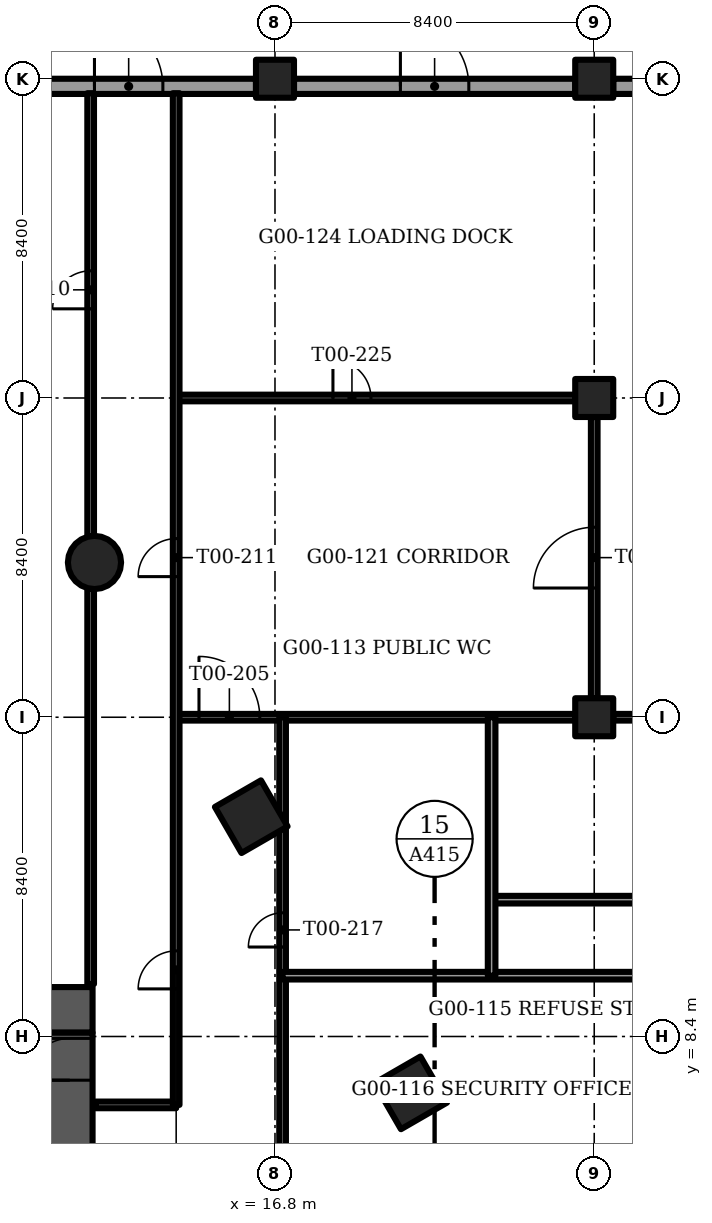
"""IFC4 building model, lengths in metres.
Left out: names, types, materials, properties, quantities, classifications, styles, units other than length and angle.
Written with IfcOpenShell. Run it as: python <this file> out.ifc"""

import sys

from ifc_helpers import new_model, si_unit, direction, frame, frame_2d, origin, origin_2d, place, context, subcontext, project, spatial, rectangle, circle, extrude, element, fill, save


model = new_model("IFC4")
c1 = context("Model", 3, precision=1e-05, world=origin(), true_north=direction((0.0, 1.0)))
c2 = subcontext(c1, "Body", "Model", "MODEL_VIEW")
j1 = project(units=[si_unit("LENGTHUNIT", "METRE"), si_unit("PLANEANGLEUNIT", "RADIAN")], contexts=[c1])
p1 = place(None, origin())
s1 = spatial("IfcSite", under=j1, at=p1, CompositionType="ELEMENT")
p2 = place(p1, origin())
s2 = spatial("IfcBuilding", under=s1, at=p2, CompositionType="ELEMENT")
p3 = place(p2, origin())
s3 = spatial("IfcBuildingStorey", under=s2, at=p3, CompositionType="ELEMENT", Elevation=0.0)
for number, where, z_axis, x_axis in (
    (1, (16.8, 33.6, -0.35), (0.0, 0.0, 1.0), (1.0, 0.0, 0.0)),
    (2, (25.2, 16.8, -0.35), (0.0, 0.0, 1.0), (1.0, 0.0, 0.0)),
    (3, (25.2, 25.2, -0.35), (0.0, 0.0, 1.0), (1.0, 0.0, 0.0)),
    (4, (25.2, 33.6, -0.35), (0.0, 0.0, 1.0), (1.0, 0.0, 0.0)),
):
    element("IfcColumn", number, at=place(p3, frame(where, z_axis=z_axis, x_axis=x_axis)), inside=s3, PredefinedType="COLUMN", context=c2, shape_type="SweptSolid", body=[
        extrude(rectangle(XDim=1.0, YDim=1.0, at=origin_2d()), origin(), (0.0, 0.0, 1.0), 6.0),
    ])
p4 = place(p3, frame((12.051, 20.872, -0.35), z_axis=(0.0, 0.0, 1.0), x_axis=(1.0, 0.0, 0.0)))
e5 = element("IfcColumn", 5, at=p4, inside=s3, PredefinedType="COLUMN", context=c2, shape_type="SweptSolid", body=[
    extrude(circle(Radius=0.7, at=origin_2d()), origin(), (0.0, 0.0, 1.0), 5.15),
])
for number, where, z_axis, x_axis in (
    (6, (20.371, 6.917, -0.35), (0.0, 0.0, 1.0), (0.5, -0.866, 0.0)),
    (7, (16.175, 14.183, -0.35), (0.0, 0.0, 1.0), (0.5, -0.866, 0.0)),
):
    element("IfcColumn", number, at=place(p3, frame(where, z_axis=z_axis, x_axis=x_axis)), inside=s3, PredefinedType="COLUMN", context=c2, shape_type="SweptSolid", body=[
        extrude(rectangle(XDim=1.4, YDim=1.4, at=origin_2d()), origin(), (0.0, 0.0, 1.0), 5.15),
    ])
p5 = place(p3, frame((-12.0, 9.1, -0.35), z_axis=(0.0, 0.0, 1.0), x_axis=(1.0, 0.0, 0.0)))
e8 = element("IfcWall", 8, at=p5, inside=s3, PredefinedType="SHEAR", context=c2, shape_type="SweptSolid", body=[
    extrude(rectangle(XDim=24.0, YDim=1.2, at=frame_2d((12.0, 0.0))), origin(), (0.0, 0.0, 1.0), 6.0),
])
p6 = place(p5, frame((11.2, 0.0, 0.0)))
e9 = element("IfcOpeningElement", 9, at=p6, cuts=e8, PredefinedType="OPENING", context=c2, shape_type="SweptSolid", body=[
    extrude(rectangle(XDim=1.6, YDim=2.1, at=frame_2d((0.8, 1.05))), frame((0.0, 0.6, 0.0), z_axis=(0.0, -1.0, 0.0), x_axis=(1.0, 0.0, 0.0)), (0.0, 0.0, 1.0), 1.2),
])
p7 = place(p5, frame((5.25, 0.0, 0.0)))
e10 = element("IfcOpeningElement", 10, at=p7, cuts=e8, PredefinedType="OPENING", context=c2, shape_type="SweptSolid", body=[
    extrude(rectangle(XDim=1.1, YDim=2.1, at=frame_2d((0.55, 1.05))), frame((0.0, 0.6, 0.0), z_axis=(0.0, -1.0, 0.0), x_axis=(1.0, 0.0, 0.0)), (0.0, 0.0, 1.0), 1.2),
])
p8 = place(p5, frame((17.65, 0.0, 0.0)))
e11 = element("IfcOpeningElement", 11, at=p8, cuts=e8, PredefinedType="OPENING", context=c2, shape_type="SweptSolid", body=[
    extrude(rectangle(XDim=1.1, YDim=2.1, at=frame_2d((0.55, 1.05))), frame((0.0, 0.6, 0.0), z_axis=(0.0, -1.0, 0.0), x_axis=(1.0, 0.0, 0.0)), (0.0, 0.0, 1.0), 1.2),
])
p9 = place(p3, frame((11.4, -0.5, -0.35), z_axis=(0.0, 0.0, 1.0), x_axis=(0.0, 1.0, 0.0)))
e12 = element("IfcWall", 12, at=p9, inside=s3, PredefinedType="SHEAR", context=c2, shape_type="SweptSolid", body=[
    extrude(rectangle(XDim=9.0, YDim=1.2, at=frame_2d((4.5, 0.0))), origin(), (0.0, 0.0, 1.0), 6.0),
])
p10 = place(p9, frame((7.75, 0.0, 0.0)))
e13 = element("IfcOpeningElement", 13, at=p10, cuts=e12, PredefinedType="OPENING", context=c2, shape_type="SweptSolid", body=[
    extrude(rectangle(XDim=1.1, YDim=2.1, at=frame_2d((0.55, 1.05))), frame((0.0, 0.6, 0.0), z_axis=(0.0, -1.0, 0.0), x_axis=(1.0, 0.0, 0.0)), (0.0, 0.0, 1.0), 1.2),
])
p11 = place(p9, frame((0.55, 0.0, 0.0)))
e14 = element("IfcOpeningElement", 14, at=p11, cuts=e12, PredefinedType="OPENING", context=c2, shape_type="SweptSolid", body=[
    extrude(rectangle(XDim=1.2, YDim=2.1, at=frame_2d((0.6, 1.05))), frame((0.0, 0.6, 0.0), z_axis=(0.0, -1.0, 0.0), x_axis=(1.0, 0.0, 0.0)), (0.0, 0.0, 1.0), 1.2),
])
p12 = place(p9, frame((3.0, 0.0, 0.0)))
e15 = element("IfcOpeningElement", 15, at=p12, cuts=e12, PredefinedType="OPENING", context=c2, shape_type="SweptSolid", body=[
    extrude(rectangle(XDim=1.2, YDim=2.1, at=frame_2d((0.6, 1.05))), frame((0.0, 0.6, 0.0), z_axis=(0.0, -1.0, 0.0), x_axis=(1.0, 0.0, 0.0)), (0.0, 0.0, 1.0), 1.2),
])
p13 = place(p3, frame((8.9, 33.4, 0.0), z_axis=(0.0, 0.0, 1.0), x_axis=(1.0, 0.0, 0.0)))
e16 = element("IfcWall", 16, at=p13, inside=s3, PredefinedType="SOLIDWALL", context=c2, shape_type="SweptSolid", body=[
    extrude(rectangle(XDim=7.4, YDim=0.4, at=frame_2d((3.7, 0.0))), origin(), (0.0, 0.0, 1.0), 5.65),
])
p14 = place(p13, frame((3.15, 0.0, 0.0)))
e17 = element("IfcOpeningElement", 17, at=p14, cuts=e16, PredefinedType="OPENING", context=c2, shape_type="SweptSolid", body=[
    extrude(rectangle(XDim=1.8, YDim=2.1, at=frame_2d((0.9, 1.05))), frame((0.0, 0.2, 0.0), z_axis=(0.0, -1.0, 0.0), x_axis=(1.0, 0.0, 0.0)), (0.0, 0.0, 1.0), 0.4),
])
p15 = place(p3, frame((17.3, 33.4, 0.0), z_axis=(0.0, 0.0, 1.0), x_axis=(1.0, 0.0, 0.0)))
e18 = element("IfcWall", 18, at=p15, inside=s3, PredefinedType="SOLIDWALL", context=c2, shape_type="SweptSolid", body=[
    extrude(rectangle(XDim=7.4, YDim=0.4, at=frame_2d((3.7, 0.0))), origin(), (0.0, 0.0, 1.0), 5.65),
])
p16 = place(p15, frame((2.8, 0.0, 0.0)))
e19 = element("IfcOpeningElement", 19, at=p16, cuts=e18, PredefinedType="OPENING", context=c2, shape_type="SweptSolid", body=[
    extrude(rectangle(XDim=1.8, YDim=2.4, at=frame_2d((0.9, 1.2))), frame((0.0, 0.2, 0.0), z_axis=(0.0, -1.0, 0.0), x_axis=(1.0, 0.0, 0.0)), (0.0, 0.0, 1.0), 0.4),
])
p17 = place(p3, frame((25.7, 33.4, 0.0), z_axis=(0.0, 0.0, 1.0), x_axis=(1.0, 0.0, 0.0)))
e20 = element("IfcWall", 20, at=p17, inside=s3, PredefinedType="SOLIDWALL", context=c2, shape_type="SweptSolid", body=[
    extrude(rectangle(XDim=7.4, YDim=0.4, at=frame_2d((3.7, 0.0))), origin(), (0.0, 0.0, 1.0), 5.65),
])
p18 = place(p17, frame((2.2, 0.0, 1.0)))
e21 = element("IfcOpeningElement", 21, at=p18, cuts=e20, PredefinedType="OPENING", context=c2, shape_type="SweptSolid", body=[
    extrude(rectangle(XDim=3.0, YDim=2.2, at=frame_2d((1.5, 1.1))), frame((0.0, 0.2, 0.0), z_axis=(0.0, -1.0, 0.0), x_axis=(1.0, 0.0, 0.0)), (0.0, 0.0, 1.0), 0.4),
])
p19 = place(p3, frame((12.08, 6.6, 0.0), z_axis=(0.0, 0.0, 1.0), x_axis=(1.0, 0.0, 0.0)))
e22 = element("IfcWall", 22, at=p19, inside=s3, PredefinedType="PARTITIONING", context=c2, shape_type="SweptSolid", body=[
    extrude(rectangle(XDim=2.12, YDim=0.175, at=frame_2d((1.06, 0.0))), origin(), (0.0, 0.0, 1.0), 5.65),
])
p20 = place(p3, frame((14.2, 16.8, 0.0), z_axis=(0.0, 0.0, 1.0), x_axis=(1.0, 0.0, 0.0)))
e23 = element("IfcWall", 23, at=p20, inside=s3, PredefinedType="PARTITIONING", context=c2, shape_type="SweptSolid", body=[
    extrude(rectangle(XDim=10.5, YDim=0.175, at=frame_2d((5.25, 0.0))), origin(), (0.0, 0.0, 1.0), 4.8),
])
p21 = place(p20, frame((0.6, 0.0, 0.0)))
e24 = element("IfcOpeningElement", 24, at=p21, cuts=e23, PredefinedType="OPENING", context=c2, shape_type="SweptSolid", body=[
    extrude(rectangle(XDim=1.6, YDim=2.1, at=frame_2d((0.8, 1.05))), frame((0.0, 0.087, 0.0), z_axis=(0.0, -1.0, 0.0), x_axis=(1.0, 0.0, 0.0)), (0.0, 0.0, 1.0), 0.175),
])
p22 = place(p3, frame((25.7, 16.8, 0.0), z_axis=(0.0, 0.0, 1.0), x_axis=(1.0, 0.0, 0.0)))
e25 = element("IfcWall", 25, at=p22, inside=s3, PredefinedType="PARTITIONING", context=c2, shape_type="SweptSolid", body=[
    extrude(rectangle(XDim=7.4, YDim=0.175, at=frame_2d((3.7, 0.0))), origin(), (0.0, 0.0, 1.0), 5.65),
])
p23 = place(p3, frame((14.2, 25.2, 0.0), z_axis=(0.0, 0.0, 1.0), x_axis=(1.0, 0.0, 0.0)))
e26 = element("IfcWall", 26, at=p23, inside=s3, PredefinedType="PARTITIONING", context=c2, shape_type="SweptSolid", body=[
    extrude(rectangle(XDim=10.5, YDim=0.175, at=frame_2d((5.25, 0.0))), origin(), (0.0, 0.0, 1.0), 5.65),
])
p24 = place(p23, frame((4.125, 0.0, 0.0)))
e27 = element("IfcOpeningElement", 27, at=p24, cuts=e26, PredefinedType="OPENING", context=c2, shape_type="SweptSolid", body=[
    extrude(rectangle(XDim=1.0, YDim=2.1, at=frame_2d((0.5, 1.05))), frame((0.0, 0.087, 0.0), z_axis=(0.0, -1.0, 0.0), x_axis=(1.0, 0.0, 0.0)), (0.0, 0.0, 1.0), 0.175),
])
p25 = place(p3, frame((11.95, 9.78, 0.0), z_axis=(0.0, 0.0, 1.0), x_axis=(0.0, 1.0, 0.0)))
e28 = element("IfcWall", 28, at=p25, inside=s3, PredefinedType="PARTITIONING", context=c2, shape_type="SweptSolid", body=[
    extrude(rectangle(XDim=10.402, YDim=0.175, at=frame_2d((5.201, 0.0))), origin(), (0.0, 0.0, 1.0), 5.65),
])
p26 = place(p3, frame((11.95, 21.562, 0.0), z_axis=(0.0, 0.0, 1.0), x_axis=(0.0, 1.0, 0.0)))
e29 = element("IfcWall", 29, at=p26, inside=s3, PredefinedType="PARTITIONING", context=c2, shape_type="SweptSolid", body=[
    extrude(rectangle(XDim=11.658, YDim=0.175, at=frame_2d((5.829, 0.0))), origin(), (0.0, 0.0, 1.0), 5.65),
])
p27 = place(p26, frame((5.984, 0.0, 0.0)))
e30 = element("IfcOpeningElement", 30, at=p27, cuts=e29, PredefinedType="OPENING", context=c2, shape_type="SweptSolid", body=[
    extrude(rectangle(XDim=1.0, YDim=2.1, at=frame_2d((0.5, 1.05))), frame((0.0, 0.087, 0.0), z_axis=(0.0, -1.0, 0.0), x_axis=(1.0, 0.0, 0.0)), (0.0, 0.0, 1.0), 0.175),
])
p28 = place(p3, frame((14.2, 6.6, 0.0), z_axis=(0.0, 0.0, 1.0), x_axis=(0.0, 1.0, 0.0)))
e31 = element("IfcWall", 31, at=p28, inside=s3, PredefinedType="PARTITIONING", context=c2, shape_type="SweptSolid", body=[
    extrude(rectangle(XDim=26.62, YDim=0.175, at=frame_2d((13.31, 0.0))), origin(), (0.0, 0.0, 1.0), 4.8),
])
p29 = place(p28, frame((3.052, 0.0, 0.0)))
e32 = element("IfcOpeningElement", 32, at=p29, cuts=e31, PredefinedType="OPENING", context=c2, shape_type="SweptSolid", body=[
    extrude(rectangle(XDim=1.0, YDim=2.1, at=frame_2d((0.5, 1.05))), frame((0.0, 0.087, 0.0), z_axis=(0.0, -1.0, 0.0), x_axis=(1.0, 0.0, 0.0)), (0.0, 0.0, 1.0), 0.175),
])
p30 = place(p28, frame((13.9, 0.0, 0.0)))
e33 = element("IfcOpeningElement", 33, at=p30, cuts=e31, PredefinedType="OPENING", context=c2, shape_type="SweptSolid", body=[
    extrude(rectangle(XDim=1.0, YDim=2.1, at=frame_2d((0.5, 1.05))), frame((0.0, 0.087, 0.0), z_axis=(0.0, -1.0, 0.0), x_axis=(1.0, 0.0, 0.0)), (0.0, 0.0, 1.0), 0.175),
])
p31 = place(p3, frame((17.0, 4.0, 0.0), z_axis=(0.0, 0.0, 1.0), x_axis=(0.0, 1.0, 0.0)))
e34 = element("IfcWall", 34, at=p31, inside=s3, PredefinedType="PARTITIONING", context=c2, shape_type="SweptSolid", body=[
    extrude(rectangle(XDim=12.8, YDim=0.175, at=frame_2d((6.4, 0.0))), origin(), (0.0, 0.0, 1.0), 4.8),
])
p32 = place(p31, frame((6.754, 0.0, 0.0)))
e35 = element("IfcOpeningElement", 35, at=p32, cuts=e34, PredefinedType="OPENING", context=c2, shape_type="SweptSolid", body=[
    extrude(rectangle(XDim=0.9, YDim=2.1, at=frame_2d((0.45, 1.05))), frame((0.0, 0.087, 0.0), z_axis=(0.0, -1.0, 0.0), x_axis=(1.0, 0.0, 0.0)), (0.0, 0.0, 1.0), 0.175),
])
p33 = place(p3, frame((25.2, 17.3, 0.0), z_axis=(0.0, 0.0, 1.0), x_axis=(0.0, 1.0, 0.0)))
e36 = element("IfcWall", 36, at=p33, inside=s3, PredefinedType="PARTITIONING", context=c2, shape_type="SweptSolid", body=[
    extrude(rectangle(XDim=7.4, YDim=0.175, at=frame_2d((3.7, 0.0))), origin(), (0.0, 0.0, 1.0), 5.65),
])
p34 = place(p33, frame((2.9, 0.0, 0.0)))
e37 = element("IfcOpeningElement", 37, at=p34, cuts=e36, PredefinedType="OPENING", context=c2, shape_type="SweptSolid", body=[
    extrude(rectangle(XDim=1.6, YDim=2.1, at=frame_2d((0.8, 1.05))), frame((0.0, 0.087, 0.0), z_axis=(0.0, -1.0, 0.0), x_axis=(1.0, 0.0, 0.0)), (0.0, 0.0, 1.0), 0.175),
])
p35 = place(p3, frame((17.0, 10.0, 0.0), z_axis=(0.0, 0.0, 1.0), x_axis=(1.0, 0.0, 0.0)))
e38 = element("IfcWall", 38, at=p35, inside=s3, PredefinedType="PARTITIONING", context=c2, shape_type="SweptSolid", body=[
    extrude(rectangle(XDim=11.0, YDim=0.2, at=frame_2d((5.5, 0.0))), origin(), (0.0, 0.0, 1.0), 4.8),
])
p36 = place(p3, frame((22.5, 12.0, 0.0), z_axis=(0.0, 0.0, 1.0), x_axis=(1.0, 0.0, 0.0)))
e39 = element("IfcWall", 39, at=p36, inside=s3, PredefinedType="PARTITIONING", context=c2, shape_type="SweptSolid", body=[
    extrude(rectangle(XDim=5.5, YDim=0.2, at=frame_2d((2.75, 0.0))), origin(), (0.0, 0.0, 1.0), 5.65),
])
p37 = place(p3, frame((22.5, 10.0, 0.0), z_axis=(0.0, 0.0, 1.0), x_axis=(0.0, 1.0, 0.0)))
e40 = element("IfcWall", 40, at=p37, inside=s3, PredefinedType="PARTITIONING", context=c2, shape_type="SweptSolid", body=[
    extrude(rectangle(XDim=6.8, YDim=0.2, at=frame_2d((3.4, 0.0))), origin(), (0.0, 0.0, 1.0), 5.65),
])
p38 = place(p16, origin())
e41 = element("IfcDoor", 41, at=p38, inside=s3, OperationType="SINGLE_SWING_LEFT", PredefinedType="DOOR", context=c2, shape_type="SweptSolid", body=[
    extrude(rectangle(XDim=1.8, YDim=2.4, at=frame_2d((0.9, 1.2))), frame((0.0, 0.025, 0.0), z_axis=(0.0, -1.0, 0.0), x_axis=(1.0, 0.0, 0.0)), (0.0, 0.0, 1.0), 0.05),
])
fill(e19, e41)
p39 = place(p10, origin())
e42 = element("IfcDoor", 42, at=p39, inside=s3, OperationType="SINGLE_SWING_RIGHT", PredefinedType="DOOR", context=c2, shape_type="SweptSolid", body=[
    extrude(rectangle(XDim=1.1, YDim=2.1, at=frame_2d((0.55, 1.05))), frame((0.0, 0.025, 0.0), z_axis=(0.0, -1.0, 0.0), x_axis=(1.0, 0.0, 0.0)), (0.0, 0.0, 1.0), 0.05),
])
fill(e13, e42)
p40 = place(p21, origin())
e43 = element("IfcDoor", 43, at=p40, inside=s3, OperationType="DOUBLE_DOOR_SINGLE_SWING", PredefinedType="DOOR", context=c2, shape_type="SweptSolid", body=[
    extrude(rectangle(XDim=1.6, YDim=2.1, at=frame_2d((0.8, 1.05))), frame((0.0, 0.025, 0.0), z_axis=(0.0, -1.0, 0.0), x_axis=(1.0, 0.0, 0.0)), (0.0, 0.0, 1.0), 0.05),
])
fill(e24, e43)
p41 = place(p29, origin())
e44 = element("IfcDoor", 44, at=p41, inside=s3, OperationType="SINGLE_SWING_LEFT", PredefinedType="DOOR", context=c2, shape_type="SweptSolid", body=[
    extrude(rectangle(XDim=1.0, YDim=2.1, at=frame_2d((0.5, 1.05))), frame((0.0, 0.025, 0.0), z_axis=(0.0, -1.0, 0.0), x_axis=(1.0, 0.0, 0.0)), (0.0, 0.0, 1.0), 0.05),
])
fill(e32, e44)
p42 = place(p27, origin())
e45 = element("IfcDoor", 45, at=p42, inside=s3, OperationType="SINGLE_SWING_RIGHT", PredefinedType="DOOR", context=c2, shape_type="SweptSolid", body=[
    extrude(rectangle(XDim=1.0, YDim=2.1, at=frame_2d((0.5, 1.05))), frame((0.0, 0.025, 0.0), z_axis=(0.0, -1.0, 0.0), x_axis=(1.0, 0.0, 0.0)), (0.0, 0.0, 1.0), 0.05),
])
fill(e30, e45)
p43 = place(p30, origin())
e46 = element("IfcDoor", 46, at=p43, inside=s3, OperationType="SINGLE_SWING_LEFT", PredefinedType="DOOR", context=c2, shape_type="SweptSolid", body=[
    extrude(rectangle(XDim=1.0, YDim=2.1, at=frame_2d((0.5, 1.05))), frame((0.0, 0.025, 0.0), z_axis=(0.0, -1.0, 0.0), x_axis=(1.0, 0.0, 0.0)), (0.0, 0.0, 1.0), 0.05),
])
fill(e33, e46)
p44 = place(p32, origin())
e47 = element("IfcDoor", 47, at=p44, inside=s3, OperationType="SINGLE_SWING_LEFT", PredefinedType="DOOR", context=c2, shape_type="SweptSolid", body=[
    extrude(rectangle(XDim=0.9, YDim=2.1, at=frame_2d((0.45, 1.05))), frame((0.0, 0.025, 0.0), z_axis=(0.0, -1.0, 0.0), x_axis=(1.0, 0.0, 0.0)), (0.0, 0.0, 1.0), 0.05),
])
fill(e35, e47)
p45 = place(p24, origin())
e48 = element("IfcDoor", 48, at=p45, inside=s3, OperationType="SINGLE_SWING_LEFT", PredefinedType="DOOR", context=c2, shape_type="SweptSolid", body=[
    extrude(rectangle(XDim=1.0, YDim=2.1, at=frame_2d((0.5, 1.05))), frame((0.0, 0.025, 0.0), z_axis=(0.0, -1.0, 0.0), x_axis=(1.0, 0.0, 0.0)), (0.0, 0.0, 1.0), 0.05),
])
fill(e27, e48)
p46 = place(p34, origin())
e49 = element("IfcDoor", 49, at=p46, inside=s3, OperationType="DOUBLE_DOOR_SINGLE_SWING", PredefinedType="DOOR", context=c2, shape_type="SweptSolid", body=[
    extrude(rectangle(XDim=1.6, YDim=2.1, at=frame_2d((0.8, 1.05))), frame((0.0, 0.025, 0.0), z_axis=(0.0, -1.0, 0.0), x_axis=(1.0, 0.0, 0.0)), (0.0, 0.0, 1.0), 0.05),
])
fill(e37, e49)
p47 = place(p14, origin())
e50 = element("IfcDoor", 50, at=p47, inside=s3, OperationType="SINGLE_SWING_LEFT", PredefinedType="DOOR", context=c2, shape_type="SweptSolid", body=[
    extrude(rectangle(XDim=1.8, YDim=2.1, at=frame_2d((0.9, 1.05))), frame((0.0, 0.025, 0.0), z_axis=(0.0, -1.0, 0.0), x_axis=(1.0, 0.0, 0.0)), (0.0, 0.0, 1.0), 0.05),
])
fill(e17, e50)
save(model, sys.argv[1])
